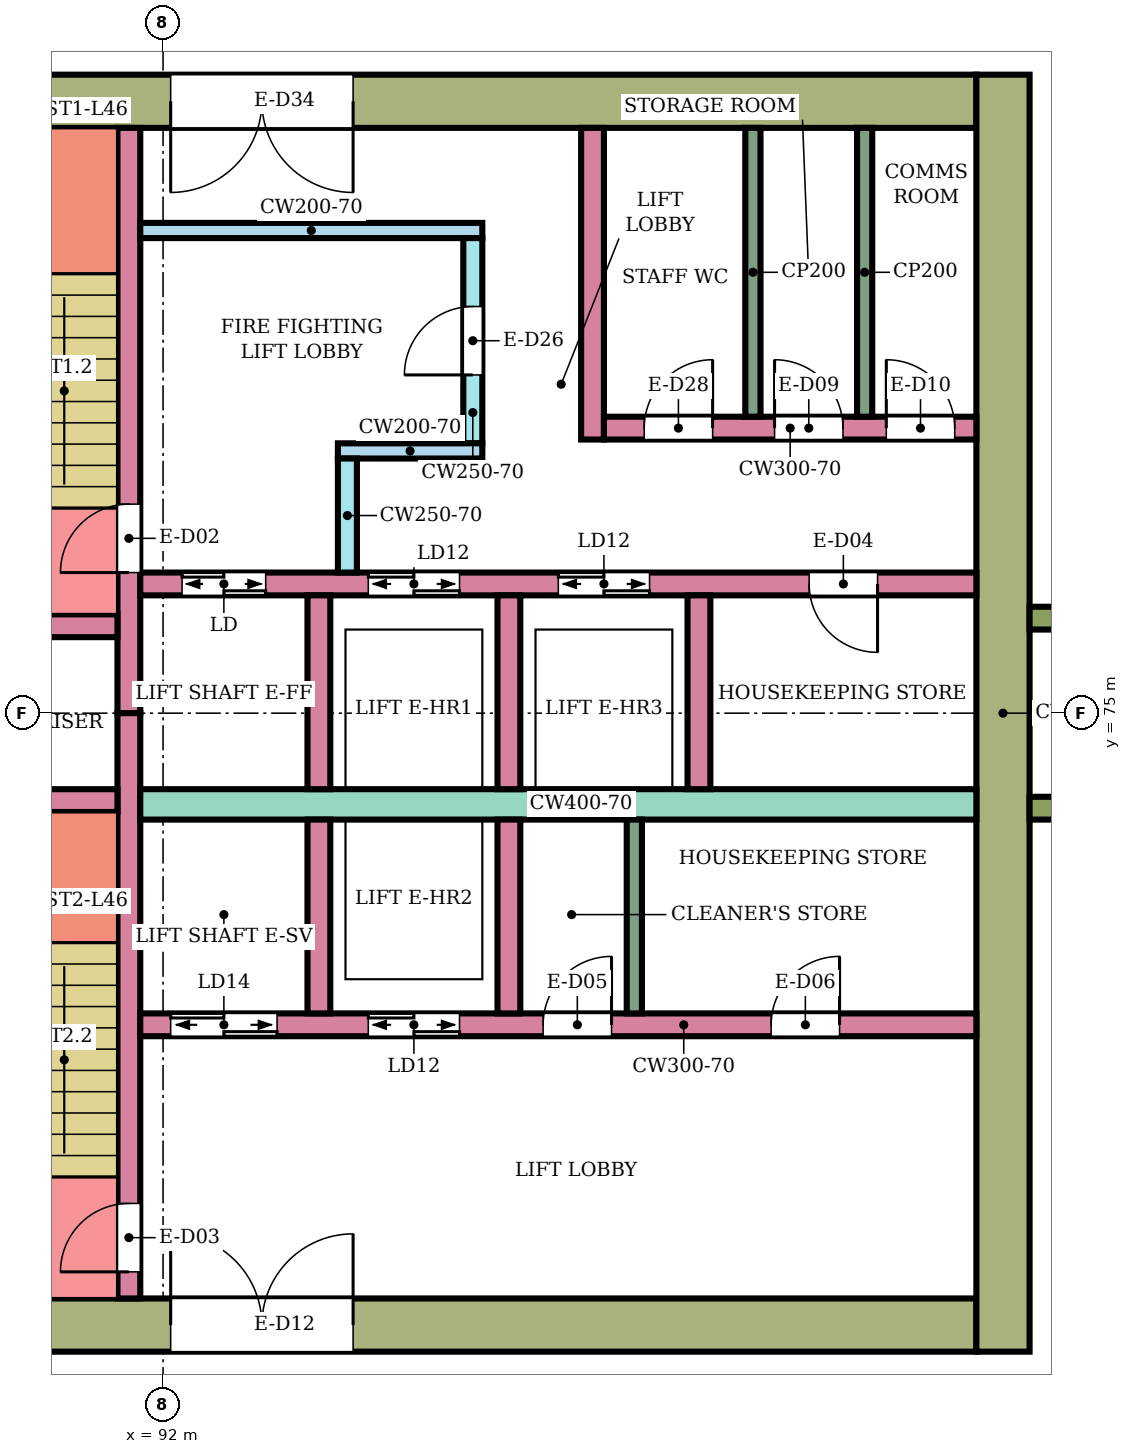
"""IFC4 building model, lengths in metres.
Left out: names, types, materials, properties, quantities, classifications, styles, units other than length and angle.
Written with IfcOpenShell. Run it as: python <this file> out.ifc"""

import sys

from ifc_helpers import new_model, si_unit, direction, frame, frame_2d, origin, place, context, subcontext, project, spatial, rectangle, extrude, element, fill, save


model = new_model("IFC4")
c1 = context("Model", 3, precision=1e-05, world=origin(), true_north=direction((0.0, 1.0)))
c2 = subcontext(c1, "Body", "Model", "MODEL_VIEW")
j1 = project(units=[si_unit("LENGTHUNIT", "METRE"), si_unit("PLANEANGLEUNIT", "RADIAN")], contexts=[c1])
p1 = place(None, origin())
s1 = spatial("IfcSite", under=j1, at=p1, CompositionType="ELEMENT")
p2 = place(p1, origin())
s2 = spatial("IfcBuilding", under=s1, at=p2, CompositionType="ELEMENT")
p3 = place(p2, frame((0.0, 0.0, 198.7)))
s3 = spatial("IfcBuildingStorey", under=s2, at=p3, CompositionType="ELEMENT", Elevation=198.7)
p4 = place(p3, frame((87.9, 83.05, 0.0), z_axis=(0.0, 0.0, 1.0), x_axis=(1.0, 0.0, 0.0)))
e1 = element("IfcWall", 1, at=p4, inside=s3, PredefinedType="SHEAR", context=c2, shape_type="SweptSolid", body=[
    extrude(rectangle(XDim=14.8, YDim=0.7, at=frame_2d((7.4, 0.0))), origin(), (0.0, 0.0, 1.0), 3.78),
])
p5 = place(p4, frame((4.2, 0.0, 0.0)))
e2 = element("IfcOpeningElement", 2, at=p5, cuts=e1, PredefinedType="OPENING", context=c2, shape_type="SweptSolid", body=[
    extrude(rectangle(XDim=2.4, YDim=2.4, at=frame_2d((1.2, 1.2))), frame((0.0, 0.36, 0.0), z_axis=(0.0, -1.0, 0.0), x_axis=(1.0, 0.0, 0.0)), (0.0, 0.0, 1.0), 0.72),
])
p6 = place(p3, frame((87.9, 66.95, 0.0), z_axis=(0.0, 0.0, 1.0), x_axis=(1.0, 0.0, 0.0)))
e3 = element("IfcWall", 3, at=p6, inside=s3, PredefinedType="SHEAR", context=c2, shape_type="SweptSolid", body=[
    extrude(rectangle(XDim=14.8, YDim=0.7, at=frame_2d((7.4, 0.0))), origin(), (0.0, 0.0, 1.0), 3.78),
])
p7 = place(p6, frame((4.2, 0.0, 0.0)))
e4 = element("IfcOpeningElement", 4, at=p7, cuts=e3, PredefinedType="OPENING", context=c2, shape_type="SweptSolid", body=[
    extrude(rectangle(XDim=2.4, YDim=2.4, at=frame_2d((1.2, 1.2))), frame((0.0, 0.36, 0.0), z_axis=(0.0, -1.0, 0.0), x_axis=(1.0, 0.0, 0.0)), (0.0, 0.0, 1.0), 0.72),
])
p8 = place(p3, frame((103.05, 66.6, 0.0), z_axis=(0.0, 0.0, 1.0), x_axis=(0.0, 1.0, 0.0)))
e5 = element("IfcWall", 5, at=p8, inside=s3, PredefinedType="SHEAR", context=c2, shape_type="SweptSolid", body=[
    extrude(rectangle(XDim=16.8, YDim=0.7, at=frame_2d((8.4, 0.0))), origin(), (0.0, 0.0, 1.0), 3.78),
])
p9 = place(p3, frame((91.55, 75.0, 0.0), z_axis=(0.0, 0.0, 1.0), x_axis=(0.0, 1.0, 0.0)))
e6 = element("IfcWall", 6, at=p9, inside=s3, PredefinedType="SHEAR", context=c2, shape_type="SweptSolid", body=[
    extrude(rectangle(XDim=7.7, YDim=0.3, at=frame_2d((3.85, 0.0))), origin(), (0.0, 0.0, 1.0), 3.78),
])
p10 = place(p9, frame((1.85, 0.0, 0.0)))
e7 = element("IfcOpeningElement", 7, at=p10, cuts=e6, PredefinedType="OPENING", context=c2, shape_type="SweptSolid", body=[
    extrude(rectangle(XDim=0.9, YDim=2.1, at=frame_2d((0.45, 1.05))), frame((0.0, 0.16, 0.0), z_axis=(0.0, -1.0, 0.0), x_axis=(1.0, 0.0, 0.0)), (0.0, 0.0, 1.0), 0.32),
])
p11 = place(p3, frame((91.55, 67.3, 0.0), z_axis=(0.0, 0.0, 1.0), x_axis=(0.0, 1.0, 0.0)))
e8 = element("IfcWall", 8, at=p11, inside=s3, PredefinedType="SHEAR", context=c2, shape_type="SweptSolid", body=[
    extrude(rectangle(XDim=7.7, YDim=0.3, at=frame_2d((3.85, 0.0))), origin(), (0.0, 0.0, 1.0), 3.78),
])
p12 = place(p11, frame((0.35, 0.0, 0.0)))
e9 = element("IfcOpeningElement", 9, at=p12, cuts=e8, PredefinedType="OPENING", context=c2, shape_type="SweptSolid", body=[
    extrude(rectangle(XDim=0.9, YDim=2.1, at=frame_2d((0.45, 1.05))), frame((0.0, 0.16, 0.0), z_axis=(0.0, -1.0, 0.0), x_axis=(1.0, 0.0, 0.0)), (0.0, 0.0, 1.0), 0.32),
])
p13 = place(p3, frame((88.35, 76.15, 0.0), z_axis=(0.0, 0.0, 1.0), x_axis=(1.0, 0.0, 0.0)))
e10 = element("IfcWall", 10, at=p13, inside=s3, PredefinedType="SHEAR", context=c2, shape_type="SweptSolid", body=[
    extrude(rectangle(XDim=3.05, YDim=0.3, at=frame_2d((1.525, 0.0))), origin(), (0.0, 0.0, 1.0), 3.78),
])
p14 = place(p13, frame((1.1, 0.0, 0.0)))
e11 = element("IfcOpeningElement", 11, at=p14, cuts=e10, PredefinedType="OPENING", context=c2, shape_type="SweptSolid", body=[
    extrude(rectangle(XDim=0.7, YDim=2.0, at=frame_2d((0.35, 1.0))), frame((0.0, 0.16, 0.0), z_axis=(0.0, -1.0, 0.0), x_axis=(1.0, 0.0, 0.0)), (0.0, 0.0, 1.0), 0.32),
])
p15 = place(p3, frame((88.35, 73.85, 0.0), z_axis=(0.0, 0.0, 1.0), x_axis=(1.0, 0.0, 0.0)))
e12 = element("IfcWall", 12, at=p15, inside=s3, PredefinedType="SHEAR", context=c2, shape_type="SweptSolid", body=[
    extrude(rectangle(XDim=3.05, YDim=0.3, at=frame_2d((1.525, 0.0))), origin(), (0.0, 0.0, 1.0), 3.78),
])
p16 = place(p3, frame((91.7, 76.7, 0.0), z_axis=(0.0, 0.0, 1.0), x_axis=(1.0, 0.0, 0.0)))
e13 = element("IfcWall", 13, at=p16, inside=s3, PredefinedType="SHEAR", context=c2, shape_type="SweptSolid", body=[
    extrude(rectangle(XDim=11.0, YDim=0.3, at=frame_2d((5.5, 0.0))), origin(), (0.0, 0.0, 1.0), 3.78),
])
p17 = place(p16, frame((0.55, 0.0, 0.0)))
e14 = element("IfcOpeningElement", 14, at=p17, cuts=e13, PredefinedType="OPENING", context=c2, shape_type="SweptSolid", body=[
    extrude(rectangle(XDim=1.1, YDim=2.1, at=frame_2d((0.55, 1.05))), frame((0.0, 0.16, 0.0), z_axis=(0.0, -1.0, 0.0), x_axis=(1.0, 0.0, 0.0)), (0.0, 0.0, 1.0), 0.32),
])
p18 = place(p16, frame((3.0, 0.0, 0.0)))
e15 = element("IfcOpeningElement", 15, at=p18, cuts=e13, PredefinedType="OPENING", context=c2, shape_type="SweptSolid", body=[
    extrude(rectangle(XDim=1.2, YDim=2.1, at=frame_2d((0.6, 1.05))), frame((0.0, 0.16, 0.0), z_axis=(0.0, -1.0, 0.0), x_axis=(1.0, 0.0, 0.0)), (0.0, 0.0, 1.0), 0.32),
])
p19 = place(p16, frame((5.5, 0.0, 0.0)))
e16 = element("IfcOpeningElement", 16, at=p19, cuts=e13, PredefinedType="OPENING", context=c2, shape_type="SweptSolid", body=[
    extrude(rectangle(XDim=1.2, YDim=2.1, at=frame_2d((0.6, 1.05))), frame((0.0, 0.16, 0.0), z_axis=(0.0, -1.0, 0.0), x_axis=(1.0, 0.0, 0.0)), (0.0, 0.0, 1.0), 0.32),
])
p20 = place(p16, frame((8.8, 0.0, 0.0)))
e17 = element("IfcOpeningElement", 17, at=p20, cuts=e13, PredefinedType="OPENING", context=c2, shape_type="SweptSolid", body=[
    extrude(rectangle(XDim=0.9, YDim=2.1, at=frame_2d((0.45, 1.05))), frame((0.0, 0.16, 0.0), z_axis=(0.0, -1.0, 0.0), x_axis=(1.0, 0.0, 0.0)), (0.0, 0.0, 1.0), 0.32),
])
p21 = place(p3, frame((91.7, 73.8, 0.0), z_axis=(0.0, 0.0, 1.0), x_axis=(1.0, 0.0, 0.0)))
e18 = element("IfcWall", 18, at=p21, inside=s3, PredefinedType="SHEAR", context=c2, shape_type="SweptSolid", body=[
    extrude(rectangle(XDim=11.0, YDim=0.4, at=frame_2d((5.5, 0.0))), origin(), (0.0, 0.0, 1.0), 3.78),
])
p22 = place(p3, frame((91.7, 70.9, 0.0), z_axis=(0.0, 0.0, 1.0), x_axis=(1.0, 0.0, 0.0)))
e19 = element("IfcWall", 19, at=p22, inside=s3, PredefinedType="SHEAR", context=c2, shape_type="SweptSolid", body=[
    extrude(rectangle(XDim=11.0, YDim=0.3, at=frame_2d((5.5, 0.0))), origin(), (0.0, 0.0, 1.0), 3.78),
])
p23 = place(p22, frame((0.4, 0.0, 0.0)))
e20 = element("IfcOpeningElement", 20, at=p23, cuts=e19, PredefinedType="OPENING", context=c2, shape_type="SweptSolid", body=[
    extrude(rectangle(XDim=1.4, YDim=2.1, at=frame_2d((0.7, 1.05))), frame((0.0, 0.16, 0.0), z_axis=(0.0, -1.0, 0.0), x_axis=(1.0, 0.0, 0.0)), (0.0, 0.0, 1.0), 0.32),
])
p24 = place(p22, frame((3.0, 0.0, 0.0)))
e21 = element("IfcOpeningElement", 21, at=p24, cuts=e19, PredefinedType="OPENING", context=c2, shape_type="SweptSolid", body=[
    extrude(rectangle(XDim=1.2, YDim=2.1, at=frame_2d((0.6, 1.05))), frame((0.0, 0.16, 0.0), z_axis=(0.0, -1.0, 0.0), x_axis=(1.0, 0.0, 0.0)), (0.0, 0.0, 1.0), 0.32),
])
p25 = place(p22, frame((5.3, 0.0, 0.0)))
e22 = element("IfcOpeningElement", 22, at=p25, cuts=e19, PredefinedType="OPENING", context=c2, shape_type="SweptSolid", body=[
    extrude(rectangle(XDim=0.9, YDim=2.1, at=frame_2d((0.45, 1.05))), frame((0.0, 0.16, 0.0), z_axis=(0.0, -1.0, 0.0), x_axis=(1.0, 0.0, 0.0)), (0.0, 0.0, 1.0), 0.32),
])
p26 = place(p22, frame((8.3, 0.0, 0.0)))
e23 = element("IfcOpeningElement", 23, at=p26, cuts=e19, PredefinedType="OPENING", context=c2, shape_type="SweptSolid", body=[
    extrude(rectangle(XDim=0.9, YDim=2.1, at=frame_2d((0.45, 1.05))), frame((0.0, 0.16, 0.0), z_axis=(0.0, -1.0, 0.0), x_axis=(1.0, 0.0, 0.0)), (0.0, 0.0, 1.0), 0.32),
])
for number, where, z_axis, x_axis in (
    (24, (94.05, 74.0, 0.0), (0.0, 0.0, 1.0), (0.0, 1.0, 0.0)),
    (25, (96.55, 74.0, 0.0), (0.0, 0.0, 1.0), (0.0, 1.0, 0.0)),
    (26, (99.05, 74.0, 0.0), (0.0, 0.0, 1.0), (0.0, 1.0, 0.0)),
    (27, (94.05, 71.05, 0.0), (0.0, 0.0, 1.0), (0.0, 1.0, 0.0)),
    (28, (96.55, 71.05, 0.0), (0.0, 0.0, 1.0), (0.0, 1.0, 0.0)),
):
    element("IfcWall", number, at=place(p3, frame(where, z_axis=z_axis, x_axis=x_axis)), inside=s3, PredefinedType="SHEAR", context=c2, shape_type="SweptSolid", body=[
        extrude(rectangle(XDim=2.55, YDim=0.3, at=frame_2d((1.275, 0.0))), origin(), (0.0, 0.0, 1.0), 3.78),
    ])
p27 = place(p3, frame((91.7, 81.35, 0.0), z_axis=(0.0, 0.0, 1.0), x_axis=(1.0, 0.0, 0.0)))
e29 = element("IfcWall", 29, at=p27, inside=s3, PredefinedType="SHEAR", context=c2, shape_type="SweptSolid", body=[
    extrude(rectangle(XDim=4.5, YDim=0.2, at=frame_2d((2.25, 0.0))), origin(), (0.0, 0.0, 1.0), 3.78),
])
p28 = place(p3, frame((96.075, 78.55, 0.0), z_axis=(0.0, 0.0, 1.0), x_axis=(0.0, 1.0, 0.0)))
e30 = element("IfcWall", 30, at=p28, inside=s3, PredefinedType="SHEAR", context=c2, shape_type="SweptSolid", body=[
    extrude(rectangle(XDim=2.7, YDim=0.25, at=frame_2d((1.35, 0.0))), origin(), (0.0, 0.0, 1.0), 3.78),
])
p29 = place(p28, frame((0.9, 0.0, 0.0)))
e31 = element("IfcOpeningElement", 31, at=p29, cuts=e30, PredefinedType="OPENING", context=c2, shape_type="SweptSolid", body=[
    extrude(rectangle(XDim=0.9, YDim=2.1, at=frame_2d((0.45, 1.05))), frame((0.0, 0.135, 0.0), z_axis=(0.0, -1.0, 0.0), x_axis=(1.0, 0.0, 0.0)), (0.0, 0.0, 1.0), 0.27),
])
p30 = place(p3, frame((94.3, 78.45, 0.0), z_axis=(0.0, 0.0, 1.0), x_axis=(1.0, 0.0, 0.0)))
e32 = element("IfcWall", 32, at=p30, inside=s3, PredefinedType="SHEAR", context=c2, shape_type="SweptSolid", body=[
    extrude(rectangle(XDim=1.9, YDim=0.2, at=frame_2d((0.95, 0.0))), origin(), (0.0, 0.0, 1.0), 3.78),
])
p31 = place(p3, frame((94.425, 76.85, 0.0), z_axis=(0.0, 0.0, 1.0), x_axis=(0.0, 1.0, 0.0)))
e33 = element("IfcWall", 33, at=p31, inside=s3, PredefinedType="SHEAR", context=c2, shape_type="SweptSolid", body=[
    extrude(rectangle(XDim=1.5, YDim=0.25, at=frame_2d((0.75, 0.0))), origin(), (0.0, 0.0, 1.0), 3.78),
])
p32 = place(p3, frame((97.65, 78.6, 0.0), z_axis=(0.0, 0.0, 1.0), x_axis=(0.0, 1.0, 0.0)))
e34 = element("IfcWall", 34, at=p32, inside=s3, PredefinedType="SHEAR", context=c2, shape_type="SweptSolid", body=[
    extrude(rectangle(XDim=4.1, YDim=0.3, at=frame_2d((2.05, 0.0))), origin(), (0.0, 0.0, 1.0), 3.78),
])
p33 = place(p3, frame((97.8, 78.75, 0.0), z_axis=(0.0, 0.0, 1.0), x_axis=(1.0, 0.0, 0.0)))
e35 = element("IfcWall", 35, at=p33, inside=s3, PredefinedType="SHEAR", context=c2, shape_type="SweptSolid", body=[
    extrude(rectangle(XDim=4.9, YDim=0.3, at=frame_2d((2.45, 0.0))), origin(), (0.0, 0.0, 1.0), 3.78),
])
p34 = place(p33, frame((0.53, 0.0, 0.0)))
e36 = element("IfcOpeningElement", 36, at=p34, cuts=e35, PredefinedType="OPENING", context=c2, shape_type="SweptSolid", body=[
    extrude(rectangle(XDim=0.9, YDim=2.1, at=frame_2d((0.45, 1.05))), frame((0.0, 0.16, 0.0), z_axis=(0.0, -1.0, 0.0), x_axis=(1.0, 0.0, 0.0)), (0.0, 0.0, 1.0), 0.32),
])
p35 = place(p33, frame((2.245, 0.0, 0.0)))
e37 = element("IfcOpeningElement", 37, at=p35, cuts=e35, PredefinedType="OPENING", context=c2, shape_type="SweptSolid", body=[
    extrude(rectangle(XDim=0.9, YDim=2.1, at=frame_2d((0.45, 1.05))), frame((0.0, 0.16, 0.0), z_axis=(0.0, -1.0, 0.0), x_axis=(1.0, 0.0, 0.0)), (0.0, 0.0, 1.0), 0.32),
])
p36 = place(p33, frame((3.715, 0.0, 0.0)))
e38 = element("IfcOpeningElement", 38, at=p36, cuts=e35, PredefinedType="OPENING", context=c2, shape_type="SweptSolid", body=[
    extrude(rectangle(XDim=0.9, YDim=2.1, at=frame_2d((0.45, 1.05))), frame((0.0, 0.16, 0.0), z_axis=(0.0, -1.0, 0.0), x_axis=(1.0, 0.0, 0.0)), (0.0, 0.0, 1.0), 0.32),
])
for number, where, z_axis, x_axis in (
    (39, (103.4, 73.75, 0.0), (0.0, 0.0, 1.0), (1.0, 0.0, 0.0)),
    (40, (103.4, 76.25, 0.0), (0.0, 0.0, 1.0), (1.0, 0.0, 0.0)),
):
    element("IfcWall", number, at=place(p3, frame(where, z_axis=z_axis, x_axis=x_axis)), inside=s3, PredefinedType="NOTDEFINED", context=c2, shape_type="SweptSolid", body=[
        extrude(rectangle(XDim=2.416, YDim=0.3, at=frame_2d((1.208, 0.0))), origin(), (0.0, 0.0, 1.0), 4.1),
    ])
p37 = place(p3, frame((98.2, 71.05, 0.0), z_axis=(0.0, 0.0, 1.0), x_axis=(0.0, 1.0, 0.0)))
e41 = element("IfcWall", 41, at=p37, inside=s3, PredefinedType="PARTITIONING", context=c2, shape_type="SweptSolid", body=[
    extrude(rectangle(XDim=2.55, YDim=0.2, at=frame_2d((1.275, 0.0))), origin(), (0.0, 0.0, 1.0), 3.78),
])
for number, where, z_axis, x_axis in (
    (42, (99.76, 78.9, 0.0), (0.0, 0.0, 1.0), (0.0, 1.0, 0.0)),
    (43, (101.23, 78.9, 0.0), (0.0, 0.0, 1.0), (0.0, 1.0, 0.0)),
):
    element("IfcWall", number, at=place(p3, frame(where, z_axis=z_axis, x_axis=x_axis)), inside=s3, PredefinedType="PARTITIONING", context=c2, shape_type="SweptSolid", body=[
        extrude(rectangle(XDim=3.8, YDim=0.2, at=frame_2d((1.9, 0.0))), origin(), (0.0, 0.0, 1.0), 3.78),
    ])
p38 = place(p10, origin())
e44 = element("IfcDoor", 44, at=p38, inside=s3, OperationType="SINGLE_SWING_LEFT", PredefinedType="DOOR", context=c2, shape_type="SweptSolid", body=[
    extrude(rectangle(XDim=0.9, YDim=2.1, at=frame_2d((0.45, 1.05))), frame((0.0, 0.025, 0.0), z_axis=(0.0, -1.0, 0.0), x_axis=(1.0, 0.0, 0.0)), (0.0, 0.0, 1.0), 0.05),
])
fill(e7, e44)
p39 = place(p12, origin())
e45 = element("IfcDoor", 45, at=p39, inside=s3, OperationType="SINGLE_SWING_LEFT", PredefinedType="DOOR", context=c2, shape_type="SweptSolid", body=[
    extrude(rectangle(XDim=0.9, YDim=2.1, at=frame_2d((0.45, 1.05))), frame((0.0, 0.025, 0.0), z_axis=(0.0, -1.0, 0.0), x_axis=(1.0, 0.0, 0.0)), (0.0, 0.0, 1.0), 0.05),
])
fill(e9, e45)
p40 = place(p17, origin())
e46 = element("IfcDoor", 46, at=p40, inside=s3, OperationType="DOUBLE_DOOR_SLIDING", PredefinedType="DOOR", context=c2, shape_type="SweptSolid", body=[
    extrude(rectangle(XDim=1.1, YDim=2.1, at=frame_2d((0.55, 1.05))), frame((0.0, 0.025, 0.0), z_axis=(0.0, -1.0, 0.0), x_axis=(1.0, 0.0, 0.0)), (0.0, 0.0, 1.0), 0.05),
])
fill(e14, e46)
p41 = place(p18, origin())
e47 = element("IfcDoor", 47, at=p41, inside=s3, OperationType="DOUBLE_DOOR_SLIDING", PredefinedType="DOOR", context=c2, shape_type="SweptSolid", body=[
    extrude(rectangle(XDim=1.2, YDim=2.1, at=frame_2d((0.6, 1.05))), frame((0.0, 0.025, 0.0), z_axis=(0.0, -1.0, 0.0), x_axis=(1.0, 0.0, 0.0)), (0.0, 0.0, 1.0), 0.05),
])
fill(e15, e47)
p42 = place(p19, origin())
e48 = element("IfcDoor", 48, at=p42, inside=s3, OperationType="DOUBLE_DOOR_SLIDING", PredefinedType="DOOR", context=c2, shape_type="SweptSolid", body=[
    extrude(rectangle(XDim=1.2, YDim=2.1, at=frame_2d((0.6, 1.05))), frame((0.0, 0.025, 0.0), z_axis=(0.0, -1.0, 0.0), x_axis=(1.0, 0.0, 0.0)), (0.0, 0.0, 1.0), 0.05),
])
fill(e16, e48)
p43 = place(p20, frame((0.9, 0.0, 0.0), z_axis=(0.0, 0.0, 1.0), x_axis=(-1.0, 0.0, 0.0)))
e49 = element("IfcDoor", 49, at=p43, inside=s3, OperationType="SINGLE_SWING_LEFT", PredefinedType="DOOR", context=c2, shape_type="SweptSolid", body=[
    extrude(rectangle(XDim=0.9, YDim=2.1, at=frame_2d((0.45, 1.05))), frame((0.0, 0.025, 0.0), z_axis=(0.0, -1.0, 0.0), x_axis=(1.0, 0.0, 0.0)), (0.0, 0.0, 1.0), 0.05),
])
fill(e17, e49)
p44 = place(p23, origin())
e50 = element("IfcDoor", 50, at=p44, inside=s3, OperationType="DOUBLE_DOOR_SLIDING", PredefinedType="DOOR", context=c2, shape_type="SweptSolid", body=[
    extrude(rectangle(XDim=1.4, YDim=2.1, at=frame_2d((0.7, 1.05))), frame((0.0, 0.025, 0.0), z_axis=(0.0, -1.0, 0.0), x_axis=(1.0, 0.0, 0.0)), (0.0, 0.0, 1.0), 0.05),
])
fill(e20, e50)
p45 = place(p24, origin())
e51 = element("IfcDoor", 51, at=p45, inside=s3, OperationType="DOUBLE_DOOR_SLIDING", PredefinedType="DOOR", context=c2, shape_type="SweptSolid", body=[
    extrude(rectangle(XDim=1.2, YDim=2.1, at=frame_2d((0.6, 1.05))), frame((0.0, 0.025, 0.0), z_axis=(0.0, -1.0, 0.0), x_axis=(1.0, 0.0, 0.0)), (0.0, 0.0, 1.0), 0.05),
])
fill(e21, e51)
p46 = place(p25, origin())
e52 = element("IfcDoor", 52, at=p46, inside=s3, OperationType="SINGLE_SWING_RIGHT", PredefinedType="DOOR", context=c2, shape_type="SweptSolid", body=[
    extrude(rectangle(XDim=0.9, YDim=2.1, at=frame_2d((0.45, 1.05))), frame((0.0, 0.025, 0.0), z_axis=(0.0, -1.0, 0.0), x_axis=(1.0, 0.0, 0.0)), (0.0, 0.0, 1.0), 0.05),
])
fill(e22, e52)
p47 = place(p26, origin())
e53 = element("IfcDoor", 53, at=p47, inside=s3, OperationType="SINGLE_SWING_RIGHT", PredefinedType="DOOR", context=c2, shape_type="SweptSolid", body=[
    extrude(rectangle(XDim=0.9, YDim=2.1, at=frame_2d((0.45, 1.05))), frame((0.0, 0.025, 0.0), z_axis=(0.0, -1.0, 0.0), x_axis=(1.0, 0.0, 0.0)), (0.0, 0.0, 1.0), 0.05),
])
fill(e23, e53)
p48 = place(p29, origin())
e54 = element("IfcDoor", 54, at=p48, inside=s3, OperationType="SINGLE_SWING_LEFT", PredefinedType="DOOR", context=c2, shape_type="SweptSolid", body=[
    extrude(rectangle(XDim=0.9, YDim=2.1, at=frame_2d((0.45, 1.05))), frame((0.0, 0.025, 0.0), z_axis=(0.0, -1.0, 0.0), x_axis=(1.0, 0.0, 0.0)), (0.0, 0.0, 1.0), 0.05),
])
fill(e31, e54)
p49 = place(p34, origin())
e55 = element("IfcDoor", 55, at=p49, inside=s3, OperationType="SINGLE_SWING_RIGHT", PredefinedType="DOOR", context=c2, shape_type="SweptSolid", body=[
    extrude(rectangle(XDim=0.9, YDim=2.1, at=frame_2d((0.45, 1.05))), frame((0.0, 0.025, 0.0), z_axis=(0.0, -1.0, 0.0), x_axis=(1.0, 0.0, 0.0)), (0.0, 0.0, 1.0), 0.05),
])
fill(e36, e55)
p50 = place(p35, origin())
e56 = element("IfcDoor", 56, at=p50, inside=s3, OperationType="SINGLE_SWING_LEFT", PredefinedType="DOOR", context=c2, shape_type="SweptSolid", body=[
    extrude(rectangle(XDim=0.9, YDim=2.1, at=frame_2d((0.45, 1.05))), frame((0.0, 0.025, 0.0), z_axis=(0.0, -1.0, 0.0), x_axis=(1.0, 0.0, 0.0)), (0.0, 0.0, 1.0), 0.05),
])
fill(e37, e56)
p51 = place(p36, origin())
e57 = element("IfcDoor", 57, at=p51, inside=s3, OperationType="SINGLE_SWING_LEFT", PredefinedType="DOOR", context=c2, shape_type="SweptSolid", body=[
    extrude(rectangle(XDim=0.9, YDim=2.1, at=frame_2d((0.45, 1.05))), frame((0.0, 0.025, 0.0), z_axis=(0.0, -1.0, 0.0), x_axis=(1.0, 0.0, 0.0)), (0.0, 0.0, 1.0), 0.05),
])
fill(e38, e57)
p52 = place(p5, frame((2.4, 0.0, 0.0), z_axis=(0.0, 0.0, 1.0), x_axis=(-1.0, 0.0, 0.0)))
e58 = element("IfcDoor", 58, at=p52, inside=s3, OperationType="DOUBLE_DOOR_SINGLE_SWING", PredefinedType="DOOR", context=c2, shape_type="SweptSolid", body=[
    extrude(rectangle(XDim=2.4, YDim=2.4, at=frame_2d((1.2, 1.2))), frame((0.0, 0.025, 0.0), z_axis=(0.0, -1.0, 0.0), x_axis=(1.0, 0.0, 0.0)), (0.0, 0.0, 1.0), 0.05),
])
fill(e2, e58)
p53 = place(p7, origin())
e59 = element("IfcDoor", 59, at=p53, inside=s3, OperationType="DOUBLE_DOOR_SINGLE_SWING", PredefinedType="DOOR", context=c2, shape_type="SweptSolid", body=[
    extrude(rectangle(XDim=2.4, YDim=2.4, at=frame_2d((1.2, 1.2))), frame((0.0, 0.025, 0.0), z_axis=(0.0, -1.0, 0.0), x_axis=(1.0, 0.0, 0.0)), (0.0, 0.0, 1.0), 0.05),
])
fill(e4, e59)
save(model, sys.argv[1])
